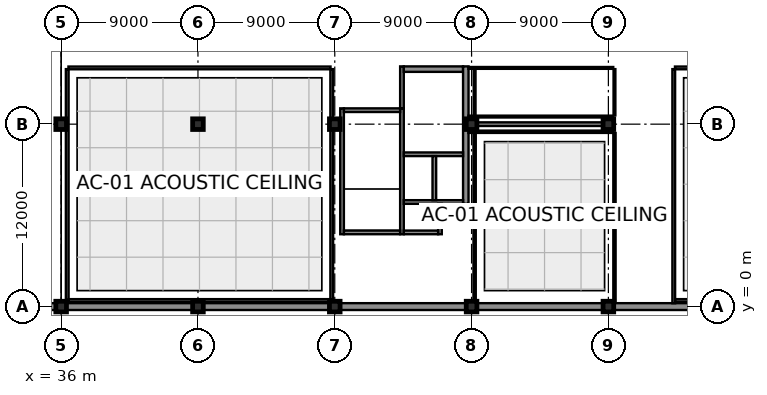
"""IFC4 building model, lengths in metres.
Left out: names, types, materials, properties, quantities, classifications, styles, units other than length and angle.
Written with IfcOpenShell. Run it as: python <this file> out.ifc"""

import sys

from ifc_helpers import new_model, si_unit, direction, frame, frame_2d, origin, origin_2d, place, context, subcontext, project, spatial, rectangle, extrude, element, fill, save


model = new_model("IFC4")
c1 = context("Model", 3, precision=1e-05, world=origin(), true_north=direction((0.0, 1.0)))
c2 = subcontext(c1, "Body", "Model", "MODEL_VIEW")
j1 = project(units=[si_unit("LENGTHUNIT", "METRE"), si_unit("PLANEANGLEUNIT", "RADIAN")], contexts=[c1])
p1 = place(None, origin())
s1 = spatial("IfcSite", under=j1, at=p1, CompositionType="ELEMENT")
p2 = place(p1, origin())
s2 = spatial("IfcBuilding", under=s1, at=p2, CompositionType="ELEMENT")
p3 = place(p2, frame((0.0, 0.0, -4.5)))
s3 = spatial("IfcBuildingStorey", under=s2, at=p3, CompositionType="ELEMENT", Elevation=-4.5)
for number, where, z_axis, x_axis in (
    (1, (36.0, 0.0, 0.0), (0.0, 0.0, 1.0), (1.0, 0.0, 0.0)),
    (2, (36.0, 12.0, 0.0), (0.0, 0.0, 1.0), (1.0, 0.0, 0.0)),
    (3, (45.0, 0.0, 0.0), (0.0, 0.0, 1.0), (1.0, 0.0, 0.0)),
    (4, (45.0, 12.0, 0.0), (0.0, 0.0, 1.0), (1.0, 0.0, 0.0)),
    (5, (54.0, 0.0, 0.0), (0.0, 0.0, 1.0), (1.0, 0.0, 0.0)),
    (6, (54.0, 12.0, 0.0), (0.0, 0.0, 1.0), (1.0, 0.0, 0.0)),
    (7, (63.0, 0.0, 0.0), (0.0, 0.0, 1.0), (1.0, 0.0, 0.0)),
    (8, (63.0, 12.0, 0.0), (0.0, 0.0, 1.0), (1.0, 0.0, 0.0)),
    (9, (72.0, 0.0, 0.0), (0.0, 0.0, 1.0), (1.0, 0.0, 0.0)),
    (10, (72.0, 12.0, 0.0), (0.0, 0.0, 1.0), (1.0, 0.0, 0.0)),
):
    element("IfcColumn", number, at=place(p3, frame(where, z_axis=z_axis, x_axis=x_axis)), inside=s3, PredefinedType="COLUMN", context=c2, shape_type="SweptSolid", body=[
        extrude(rectangle(XDim=0.7, YDim=0.7, at=origin_2d()), origin(), (0.0, 0.0, 1.0), 4.5),
    ])
for number, where, z_axis, x_axis in (
    (11, (27.346, 0.0, 0.0), (0.0, 0.0, 1.0), (1.0, 0.0, 0.0)),
    (12, (36.346, 0.0, 0.0), (0.0, 0.0, 1.0), (1.0, 0.0, 0.0)),
    (13, (45.346, 0.0, 0.0), (0.0, 0.0, 1.0), (1.0, 0.0, 0.0)),
    (14, (54.346, 0.0, 0.0), (0.0, 0.0, 1.0), (1.0, 0.0, 0.0)),
    (15, (63.346, 0.0, 0.0), (0.0, 0.0, 1.0), (1.0, 0.0, 0.0)),
):
    element("IfcWall", number, at=place(p3, frame(where, z_axis=z_axis, x_axis=x_axis)), inside=s3, PredefinedType="USERDEFINED", context=c2, shape_type="SweptSolid", body=[
        extrude(rectangle(XDim=8.308, YDim=0.45, at=frame_2d((4.154, 0.0))), origin(), (0.0, 0.0, 1.0), 4.32),
    ])
p4 = place(p3, frame((72.346, 0.0, 0.0), z_axis=(0.0, 0.0, 1.0), x_axis=(1.0, 0.0, 0.0)))
e16 = element("IfcWall", 16, at=p4, inside=s3, PredefinedType="USERDEFINED", context=c2, shape_type="SweptSolid", body=[
    extrude(rectangle(XDim=8.258, YDim=0.45, at=frame_2d((4.129, 0.0))), origin(), (0.0, 0.0, 1.0), 4.32),
])
p5 = place(p3, frame((54.48, 4.76, 0.0), z_axis=(0.0, 0.0, 1.0), x_axis=(0.0, 1.0, 0.0)))
e17 = element("IfcWall", 17, at=p5, inside=s3, PredefinedType="SHEAR", context=c2, shape_type="SweptSolid", body=[
    extrude(rectangle(XDim=8.28, YDim=0.24, at=frame_2d((4.14, 0.0))), origin(), (0.0, 0.0, 1.0), 4.31),
])
p6 = place(p3, frame((58.42, 4.76, 0.0), z_axis=(0.0, 0.0, 1.0), x_axis=(0.0, 1.0, 0.0)))
e18 = element("IfcWall", 18, at=p6, inside=s3, PredefinedType="SHEAR", context=c2, shape_type="SweptSolid", body=[
    extrude(rectangle(XDim=8.28, YDim=0.24, at=frame_2d((4.14, 0.0))), origin(), (0.0, 0.0, 1.0), 4.31),
])
p7 = place(p6, frame((6.49, 0.0, 0.0)))
e19 = element("IfcOpeningElement", 19, at=p7, cuts=e18, PredefinedType="OPENING", context=c2, shape_type="SweptSolid", body=[
    extrude(rectangle(XDim=1.3, YDim=2.2, at=frame_2d((0.65, 1.1))), frame((0.0, 0.135, 0.0), z_axis=(0.0, -1.0, 0.0), x_axis=(1.0, 0.0, 0.0)), (0.0, 0.0, 1.0), 0.27),
])
for number, where, z_axis, x_axis in (
    (20, (54.6, 4.88, 0.0), (0.0, 0.0, 1.0), (1.0, 0.0, 0.0)),
    (21, (54.6, 12.92, 0.0), (0.0, 0.0, 1.0), (1.0, 0.0, 0.0)),
):
    element("IfcWall", number, at=place(p3, frame(where, z_axis=z_axis, x_axis=x_axis)), inside=s3, PredefinedType="SHEAR", context=c2, shape_type="SweptSolid", body=[
        extrude(rectangle(XDim=3.7, YDim=0.24, at=frame_2d((1.85, 0.0))), origin(), (0.0, 0.0, 1.0), 4.31),
    ])
for number, where, z_axis, x_axis in (
    (22, (46.08, 4.76, 0.0), (0.0, 0.0, 1.0), (0.0, 1.0, 0.0)),
    (23, (50.02, 4.76, 0.0), (0.0, 0.0, 1.0), (0.0, 1.0, 0.0)),
):
    element("IfcWall", number, at=place(p3, frame(where, z_axis=z_axis, x_axis=x_axis)), inside=s3, PredefinedType="SHEAR", context=c2, shape_type="SweptSolid", body=[
        extrude(rectangle(XDim=8.28, YDim=0.24, at=frame_2d((4.14, 0.0))), origin(), (0.0, 0.0, 1.0), 4.31),
    ])
for number, where, z_axis, x_axis in (
    (24, (46.2, 4.88, 0.0), (0.0, 0.0, 1.0), (1.0, 0.0, 0.0)),
    (25, (46.2, 12.92, 0.0), (0.0, 0.0, 1.0), (1.0, 0.0, 0.0)),
):
    element("IfcWall", number, at=place(p3, frame(where, z_axis=z_axis, x_axis=x_axis)), inside=s3, PredefinedType="SHEAR", context=c2, shape_type="SweptSolid", body=[
        extrude(rectangle(XDim=3.7, YDim=0.24, at=frame_2d((1.85, 0.0))), origin(), (0.0, 0.0, 1.0), 4.31),
    ])
p8 = place(p3, frame((58.42, 13.04, 0.0), z_axis=(0.0, 0.0, 1.0), x_axis=(0.0, 1.0, 0.0)))
e26 = element("IfcWall", 26, at=p8, inside=s3, PredefinedType="SHEAR", context=c2, shape_type="SweptSolid", body=[
    extrude(rectangle(XDim=2.76, YDim=0.24, at=frame_2d((1.38, 0.0))), origin(), (0.0, 0.0, 1.0), 4.16),
])
p9 = place(p3, frame((58.54, 15.62, 0.0), z_axis=(0.0, 0.0, 1.0), x_axis=(1.0, 0.0, 0.0)))
e27 = element("IfcWall", 27, at=p9, inside=s3, PredefinedType="SHEAR", context=c2, shape_type="SweptSolid", body=[
    extrude(rectangle(XDim=3.9, YDim=0.36, at=frame_2d((1.95, 0.0))), origin(), (0.0, 0.0, 1.0), 4.16),
])
p10 = place(p9, frame((1.15, 0.0, 0.0)))
e28 = element("IfcOpeningElement", 28, at=p10, cuts=e27, PredefinedType="OPENING", context=c2, shape_type="SweptSolid", body=[
    extrude(rectangle(XDim=1.6, YDim=2.25, at=frame_2d((0.8, 1.125))), frame((0.0, 0.195, 0.0), z_axis=(0.0, -1.0, 0.0), x_axis=(1.0, 0.0, 0.0)), (0.0, 0.0, 1.0), 0.39),
])
p11 = place(p3, frame((62.62, 6.76, 0.0), z_axis=(0.0, 0.0, 1.0), x_axis=(0.0, 1.0, 0.0)))
e29 = element("IfcWall", 29, at=p11, inside=s3, PredefinedType="SHEAR", context=c2, shape_type="SweptSolid", body=[
    extrude(rectangle(XDim=9.04, YDim=0.36, at=frame_2d((4.52, 0.0))), origin(), (0.0, 0.0, 1.0), 4.16),
])
p12 = place(p3, frame((58.54, 10.02, 0.0), z_axis=(0.0, 0.0, 1.0), x_axis=(1.0, 0.0, 0.0)))
e30 = element("IfcWall", 30, at=p12, inside=s3, PredefinedType="SHEAR", context=c2, shape_type="SweptSolid", body=[
    extrude(rectangle(XDim=3.9, YDim=0.24, at=frame_2d((1.95, 0.0))), origin(), (0.0, 0.0, 1.0), 4.31),
])
p13 = place(p12, frame((0.235, 0.0, 0.0)))
e31 = element("IfcOpeningElement", 31, at=p13, cuts=e30, PredefinedType="OPENING", context=c2, shape_type="SweptSolid", body=[
    extrude(rectangle(XDim=1.6, YDim=2.3, at=frame_2d((0.8, 1.15))), frame((0.0, 0.135, 0.0), z_axis=(0.0, -1.0, 0.0), x_axis=(1.0, 0.0, 0.0)), (0.0, 0.0, 1.0), 0.27),
])
p14 = place(p12, frame((2.185, 0.0, 0.0)))
e32 = element("IfcOpeningElement", 32, at=p14, cuts=e30, PredefinedType="OPENING", context=c2, shape_type="SweptSolid", body=[
    extrude(rectangle(XDim=1.6, YDim=2.3, at=frame_2d((0.8, 1.15))), frame((0.0, 0.135, 0.0), z_axis=(0.0, -1.0, 0.0), x_axis=(1.0, 0.0, 0.0)), (0.0, 0.0, 1.0), 0.27),
])
p15 = place(p3, frame((58.54, 6.88, 0.0), z_axis=(0.0, 0.0, 1.0), x_axis=(1.0, 0.0, 0.0)))
e33 = element("IfcWall", 33, at=p15, inside=s3, PredefinedType="SHEAR", context=c2, shape_type="SweptSolid", body=[
    extrude(rectangle(XDim=3.9, YDim=0.24, at=frame_2d((1.95, 0.0))), origin(), (0.0, 0.0, 1.0), 4.31),
])
p16 = place(p3, frame((60.55, 7.0, 0.0), z_axis=(0.0, 0.0, 1.0), x_axis=(0.0, 1.0, 0.0)))
e34 = element("IfcWall", 34, at=p16, inside=s3, PredefinedType="SHEAR", context=c2, shape_type="SweptSolid", body=[
    extrude(rectangle(XDim=2.9, YDim=0.24, at=frame_2d((1.45, 0.0))), origin(), (0.0, 0.0, 1.0), 4.31),
])
p17 = place(p3, frame((60.92, 4.76, 0.0), z_axis=(0.0, 0.0, 1.0), x_axis=(0.0, 1.0, 0.0)))
e35 = element("IfcWall", 35, at=p17, inside=s3, PredefinedType="SHEAR", context=c2, shape_type="SweptSolid", body=[
    extrude(rectangle(XDim=2.0, YDim=0.24, at=frame_2d((1.0, 0.0))), origin(), (0.0, 0.0, 1.0), 4.31),
])
p18 = place(p3, frame((58.54, 4.88, 0.0), z_axis=(0.0, 0.0, 1.0), x_axis=(1.0, 0.0, 0.0)))
e36 = element("IfcWall", 36, at=p18, inside=s3, PredefinedType="SHEAR", context=c2, shape_type="SweptSolid", body=[
    extrude(rectangle(XDim=2.26, YDim=0.24, at=frame_2d((1.13, 0.0))), origin(), (0.0, 0.0, 1.0), 4.31),
])
p19 = place(p3, frame((63.346, 12.0, 0.0), z_axis=(0.0, 0.0, 1.0), x_axis=(1.0, 0.0, 0.0)))
e37 = element("IfcWall", 37, at=p19, inside=s3, PredefinedType="SHEAR", context=c2, shape_type="SweptSolid", body=[
    extrude(rectangle(XDim=8.308, YDim=0.24, at=frame_2d((4.154, 0.0))), origin(), (0.0, 0.0, 1.0), 3.685),
])
p20 = place(p3, frame((36.4, 0.346, 0.0), z_axis=(0.0, 0.0, 1.0), x_axis=(0.0, 1.0, 0.0)))
e38 = element("IfcWall", 38, at=p20, inside=s3, PredefinedType="PARTITIONING", context=c2, shape_type="SweptSolid", body=[
    extrude(rectangle(XDim=15.274, YDim=0.18, at=frame_2d((7.637, 0.0))), origin(), (0.0, 0.0, 1.0), 4.14),
])
p21 = place(p3, frame((36.48, 15.7, 0.0), z_axis=(0.0, 0.0, 1.0), x_axis=(1.0, 0.0, 0.0)))
e39 = element("IfcWall", 39, at=p21, inside=s3, PredefinedType="PARTITIONING", context=c2, shape_type="SweptSolid", body=[
    extrude(rectangle(XDim=17.24, YDim=0.18, at=frame_2d((8.62, 0.0))), origin(), (0.0, 0.0, 1.0), 4.14),
])
p22 = place(p21, frame((7.895, 0.0, 0.0)))
e40 = element("IfcOpeningElement", 40, at=p22, cuts=e39, PredefinedType="OPENING", context=c2, shape_type="SweptSolid", body=[
    extrude(rectangle(XDim=1.45, YDim=2.3, at=frame_2d((0.725, 1.15))), frame((0.0, 0.105, 0.0), z_axis=(0.0, -1.0, 0.0), x_axis=(1.0, 0.0, 0.0)), (0.0, 0.0, 1.0), 0.21),
])
p23 = place(p21, frame((14.89, 0.0, 1.05)))
e41 = element("IfcOpeningElement", 41, at=p23, cuts=e39, PredefinedType="OPENING", context=c2, shape_type="SweptSolid", body=[
    extrude(rectangle(XDim=1.5, YDim=1.1, at=frame_2d((0.75, 0.55))), frame((0.0, 0.105, 0.0), z_axis=(0.0, -1.0, 0.0), x_axis=(1.0, 0.0, 0.0)), (0.0, 0.0, 1.0), 0.21),
])
p24 = place(p3, frame((53.8, 15.62, 0.0), z_axis=(0.0, 0.0, 1.0), x_axis=(0.0, -1.0, 0.0)))
e42 = element("IfcWall", 42, at=p24, inside=s3, PredefinedType="PARTITIONING", context=c2, shape_type="SweptSolid", body=[
    extrude(rectangle(XDim=15.14, YDim=0.18, at=frame_2d((7.57, 0.0))), origin(), (0.0, 0.0, 1.0), 3.825),
])
p25 = place(p3, frame((53.72, 0.4, 0.0), z_axis=(0.0, 0.0, 1.0), x_axis=(-1.0, 0.0, 0.0)))
e43 = element("IfcWall", 43, at=p25, inside=s3, PredefinedType="PARTITIONING", context=c2, shape_type="SweptSolid", body=[
    extrude(rectangle(XDim=17.24, YDim=0.18, at=frame_2d((8.62, 0.0))), origin(), (0.0, 0.0, 1.0), 4.14),
])
p26 = place(p3, frame((63.2, 0.48, 0.0), z_axis=(0.0, 0.0, 1.0), x_axis=(0.0, 1.0, 0.0)))
e44 = element("IfcWall", 44, at=p26, inside=s3, PredefinedType="PARTITIONING", context=c2, shape_type="SweptSolid", body=[
    extrude(rectangle(XDim=10.94, YDim=0.15, at=frame_2d((5.47, 0.0))), origin(), (0.0, 0.0, 1.0), 3.785),
])
p27 = place(p3, frame((62.795, 11.5, 0.0), z_axis=(0.0, 0.0, 1.0), x_axis=(1.0, 0.0, 0.0)))
e45 = element("IfcWall", 45, at=p27, inside=s3, PredefinedType="PARTITIONING", context=c2, shape_type="SweptSolid", body=[
    extrude(rectangle(XDim=9.525, YDim=0.15, at=frame_2d((4.763, 0.0))), origin(), (0.0, 0.0, 1.0), 4.14),
])
p28 = place(p3, frame((72.4, 11.42, 0.0), z_axis=(0.0, 0.0, 1.0), x_axis=(0.0, -1.0, 0.0)))
e46 = element("IfcWall", 46, at=p28, inside=s3, PredefinedType="PARTITIONING", context=c2, shape_type="SweptSolid", body=[
    extrude(rectangle(XDim=11.074, YDim=0.15, at=frame_2d((5.537, 0.0))), origin(), (0.0, 0.0, 1.0), 4.14),
])
p29 = place(p28, frame((5.012, 0.0, 0.0)))
e47 = element("IfcOpeningElement", 47, at=p29, cuts=e46, PredefinedType="OPENING", context=c2, shape_type="SweptSolid", body=[
    extrude(rectangle(XDim=1.05, YDim=2.25, at=frame_2d((0.525, 1.125))), frame((0.0, 0.09, 0.0), z_axis=(0.0, -1.0, 0.0), x_axis=(1.0, 0.0, 0.0)), (0.0, 0.0, 1.0), 0.18),
])
p30 = place(p28, frame((9.024, 0.0, 1.05)))
e48 = element("IfcOpeningElement", 48, at=p30, cuts=e46, PredefinedType="OPENING", context=c2, shape_type="SweptSolid", body=[
    extrude(rectangle(XDim=1.2, YDim=1.0, at=frame_2d((0.6, 0.5))), frame((0.0, 0.09, 0.0), z_axis=(0.0, -1.0, 0.0), x_axis=(1.0, 0.0, 0.0)), (0.0, 0.0, 1.0), 0.18),
])
p31 = place(p3, frame((72.4, 15.62, 0.0), z_axis=(0.0, 0.0, 1.0), x_axis=(0.0, -1.0, 0.0)))
e49 = element("IfcWall", 49, at=p31, inside=s3, PredefinedType="PARTITIONING", context=c2, shape_type="SweptSolid", body=[
    extrude(rectangle(XDim=3.04, YDim=0.12, at=frame_2d((1.52, 0.0))), origin(), (0.0, 0.0, 1.0), 4.14),
])
p32 = place(p3, frame((72.32, 12.5, 0.0), z_axis=(0.0, 0.0, 1.0), x_axis=(-1.0, 0.0, 0.0)))
e50 = element("IfcWall", 50, at=p32, inside=s3, PredefinedType="PARTITIONING", context=c2, shape_type="SweptSolid", body=[
    extrude(rectangle(XDim=9.525, YDim=0.12, at=frame_2d((4.763, 0.0))), origin(), (0.0, 0.0, 1.0), 4.14),
])
p33 = place(p3, frame((63.2, 12.555, 0.0), z_axis=(0.0, 0.0, 1.0), x_axis=(0.0, 1.0, 0.0)))
e51 = element("IfcWall", 51, at=p33, inside=s3, PredefinedType="PARTITIONING", context=c2, shape_type="SweptSolid", body=[
    extrude(rectangle(XDim=3.065, YDim=0.12, at=frame_2d((1.533, 0.0))), origin(), (0.0, 0.0, 1.0), 3.785),
])
p34 = place(p3, frame((62.795, 15.7, 0.0), z_axis=(0.0, 0.0, 1.0), x_axis=(1.0, 0.0, 0.0)))
e52 = element("IfcWall", 52, at=p34, inside=s3, PredefinedType="PARTITIONING", context=c2, shape_type="SweptSolid", body=[
    extrude(rectangle(XDim=9.525, YDim=0.12, at=frame_2d((4.763, 0.0))), origin(), (0.0, 0.0, 1.0), 4.14),
])
p35 = place(p34, frame((4.288, 0.0, 0.0)))
e53 = element("IfcOpeningElement", 53, at=p35, cuts=e52, PredefinedType="OPENING", context=c2, shape_type="SweptSolid", body=[
    extrude(rectangle(XDim=0.95, YDim=2.15, at=frame_2d((0.475, 1.075))), frame((0.0, 0.075, 0.0), z_axis=(0.0, -1.0, 0.0), x_axis=(1.0, 0.0, 0.0)), (0.0, 0.0, 1.0), 0.15),
])
p36 = place(p34, frame((6.575, 0.0, 1.05)))
e54 = element("IfcOpeningElement", 54, at=p36, cuts=e52, PredefinedType="OPENING", context=c2, shape_type="SweptSolid", body=[
    extrude(rectangle(XDim=2.1, YDim=1.2, at=frame_2d((1.05, 0.6))), frame((0.0, 0.075, 0.0), z_axis=(0.0, -1.0, 0.0), x_axis=(1.0, 0.0, 0.0)), (0.0, 0.0, 1.0), 0.15),
])
p37 = place(p3, frame((107.72, 0.4, 0.0), z_axis=(0.0, 0.0, 1.0), x_axis=(-1.0, 0.0, 0.0)))
e55 = element("IfcWall", 55, at=p37, inside=s3, PredefinedType="PARTITIONING", context=c2, shape_type="SweptSolid", body=[
    extrude(rectangle(XDim=31.34, YDim=0.18, at=frame_2d((15.67, 0.0))), origin(), (0.0, 0.0, 1.0), 4.14),
])
p38 = place(p3, frame((76.3, 0.22, 0.0), z_axis=(0.0, 0.0, 1.0), x_axis=(0.0, 1.0, 0.0)))
e56 = element("IfcWall", 56, at=p38, inside=s3, PredefinedType="PARTITIONING", context=c2, shape_type="SweptSolid", body=[
    extrude(rectangle(XDim=15.4, YDim=0.18, at=frame_2d((7.7, 0.0))), origin(), (0.0, 0.0, 1.0), 4.14),
])
p39 = place(p3, frame((76.38, 15.7, 0.0), z_axis=(0.0, 0.0, 1.0), x_axis=(1.0, 0.0, 0.0)))
e57 = element("IfcWall", 57, at=p39, inside=s3, PredefinedType="PARTITIONING", context=c2, shape_type="SweptSolid", body=[
    extrude(rectangle(XDim=31.34, YDim=0.18, at=frame_2d((15.67, 0.0))), origin(), (0.0, 0.0, 1.0), 4.14),
])
p40 = place(p39, frame((14.945, 0.0, 0.0)))
e58 = element("IfcOpeningElement", 58, at=p40, cuts=e57, PredefinedType="OPENING", context=c2, shape_type="SweptSolid", body=[
    extrude(rectangle(XDim=1.45, YDim=2.3, at=frame_2d((0.725, 1.15))), frame((0.0, 0.105, 0.0), z_axis=(0.0, -1.0, 0.0), x_axis=(1.0, 0.0, 0.0)), (0.0, 0.0, 1.0), 0.21),
])
p41 = place(p39, frame((28.69, 0.0, 1.05)))
e59 = element("IfcOpeningElement", 59, at=p41, cuts=e57, PredefinedType="OPENING", context=c2, shape_type="SweptSolid", body=[
    extrude(rectangle(XDim=1.8, YDim=1.1, at=frame_2d((0.9, 0.55))), frame((0.0, 0.105, 0.0), z_axis=(0.0, -1.0, 0.0), x_axis=(1.0, 0.0, 0.0)), (0.0, 0.0, 1.0), 0.21),
])
p42 = place(p7, frame((1.3, 0.0, 0.0), z_axis=(0.0, 0.0, 1.0), x_axis=(-1.0, 0.0, 0.0)))
e60 = element("IfcDoor", 60, at=p42, inside=s3, OperationType="SINGLE_SWING_LEFT", PredefinedType="DOOR", context=c2, shape_type="SweptSolid", body=[
    extrude(rectangle(XDim=1.3, YDim=2.2, at=frame_2d((0.65, 1.1))), frame((0.0, 0.025, 0.0), z_axis=(0.0, -1.0, 0.0), x_axis=(1.0, 0.0, 0.0)), (0.0, 0.0, 1.0), 0.05),
])
fill(e19, e60)
p43 = place(p10, origin())
e61 = element("IfcDoor", 61, at=p43, inside=s3, OperationType="DOUBLE_DOOR_SINGLE_SWING", PredefinedType="DOOR", context=c2, shape_type="SweptSolid", body=[
    extrude(rectangle(XDim=1.6, YDim=2.25, at=frame_2d((0.8, 1.125))), frame((0.0, 0.025, 0.0), z_axis=(0.0, -1.0, 0.0), x_axis=(1.0, 0.0, 0.0)), (0.0, 0.0, 1.0), 0.05),
])
fill(e28, e61)
p44 = place(p13, origin())
e62 = element("IfcDoor", 62, at=p44, inside=s3, OperationType="DOUBLE_DOOR_SLIDING", PredefinedType="DOOR", context=c2, shape_type="SweptSolid", body=[
    extrude(rectangle(XDim=1.6, YDim=2.3, at=frame_2d((0.8, 1.15))), frame((0.0, 0.025, 0.0), z_axis=(0.0, -1.0, 0.0), x_axis=(1.0, 0.0, 0.0)), (0.0, 0.0, 1.0), 0.05),
])
fill(e31, e62)
p45 = place(p14, origin())
e63 = element("IfcDoor", 63, at=p45, inside=s3, OperationType="DOUBLE_DOOR_SLIDING", PredefinedType="DOOR", context=c2, shape_type="SweptSolid", body=[
    extrude(rectangle(XDim=1.6, YDim=2.3, at=frame_2d((0.8, 1.15))), frame((0.0, 0.025, 0.0), z_axis=(0.0, -1.0, 0.0), x_axis=(1.0, 0.0, 0.0)), (0.0, 0.0, 1.0), 0.05),
])
fill(e32, e63)
p46 = place(p22, origin())
e64 = element("IfcDoor", 64, at=p46, inside=s3, OperationType="DOUBLE_DOOR_SINGLE_SWING", PredefinedType="DOOR", context=c2, shape_type="SweptSolid", body=[
    extrude(rectangle(XDim=1.45, YDim=2.3, at=frame_2d((0.725, 1.15))), frame((0.0, 0.025, 0.0), z_axis=(0.0, -1.0, 0.0), x_axis=(1.0, 0.0, 0.0)), (0.0, 0.0, 1.0), 0.05),
])
fill(e40, e64)
p47 = place(p23, origin())
e65 = element("IfcWindow", 65, at=p47, inside=s3, PartitioningType="SINGLE_PANEL", PredefinedType="WINDOW", context=c2, shape_type="SweptSolid", body=[
    extrude(rectangle(XDim=1.5, YDim=1.1, at=frame_2d((0.75, 0.55))), frame((0.0, 0.03, 0.0), z_axis=(0.0, -1.0, 0.0), x_axis=(1.0, 0.0, 0.0)), (0.0, 0.0, 1.0), 0.06),
])
fill(e41, e65)
p48 = place(p29, frame((1.05, 0.0, 0.0), z_axis=(0.0, 0.0, 1.0), x_axis=(-1.0, 0.0, 0.0)))
e66 = element("IfcDoor", 66, at=p48, inside=s3, OperationType="SINGLE_SWING_RIGHT", PredefinedType="DOOR", context=c2, shape_type="SweptSolid", body=[
    extrude(rectangle(XDim=1.05, YDim=2.25, at=frame_2d((0.525, 1.125))), frame((0.0, 0.025, 0.0), z_axis=(0.0, -1.0, 0.0), x_axis=(1.0, 0.0, 0.0)), (0.0, 0.0, 1.0), 0.05),
])
fill(e47, e66)
p49 = place(p30, origin())
e67 = element("IfcWindow", 67, at=p49, inside=s3, PartitioningType="SINGLE_PANEL", PredefinedType="WINDOW", context=c2, shape_type="SweptSolid", body=[
    extrude(rectangle(XDim=1.2, YDim=1.0, at=frame_2d((0.6, 0.5))), frame((0.0, 0.03, 0.0), z_axis=(0.0, -1.0, 0.0), x_axis=(1.0, 0.0, 0.0)), (0.0, 0.0, 1.0), 0.06),
])
fill(e48, e67)
p50 = place(p35, origin())
e68 = element("IfcDoor", 68, at=p50, inside=s3, OperationType="SINGLE_SWING_LEFT", PredefinedType="DOOR", context=c2, shape_type="SweptSolid", body=[
    extrude(rectangle(XDim=0.95, YDim=2.15, at=frame_2d((0.475, 1.075))), frame((0.0, 0.025, 0.0), z_axis=(0.0, -1.0, 0.0), x_axis=(1.0, 0.0, 0.0)), (0.0, 0.0, 1.0), 0.05),
])
fill(e53, e68)
p51 = place(p36, origin())
e69 = element("IfcWindow", 69, at=p51, inside=s3, PartitioningType="SINGLE_PANEL", PredefinedType="WINDOW", context=c2, shape_type="SweptSolid", body=[
    extrude(rectangle(XDim=2.1, YDim=1.2, at=frame_2d((1.05, 0.6))), frame((0.0, 0.03, 0.0), z_axis=(0.0, -1.0, 0.0), x_axis=(1.0, 0.0, 0.0)), (0.0, 0.0, 1.0), 0.06),
])
fill(e54, e69)
save(model, sys.argv[1])
